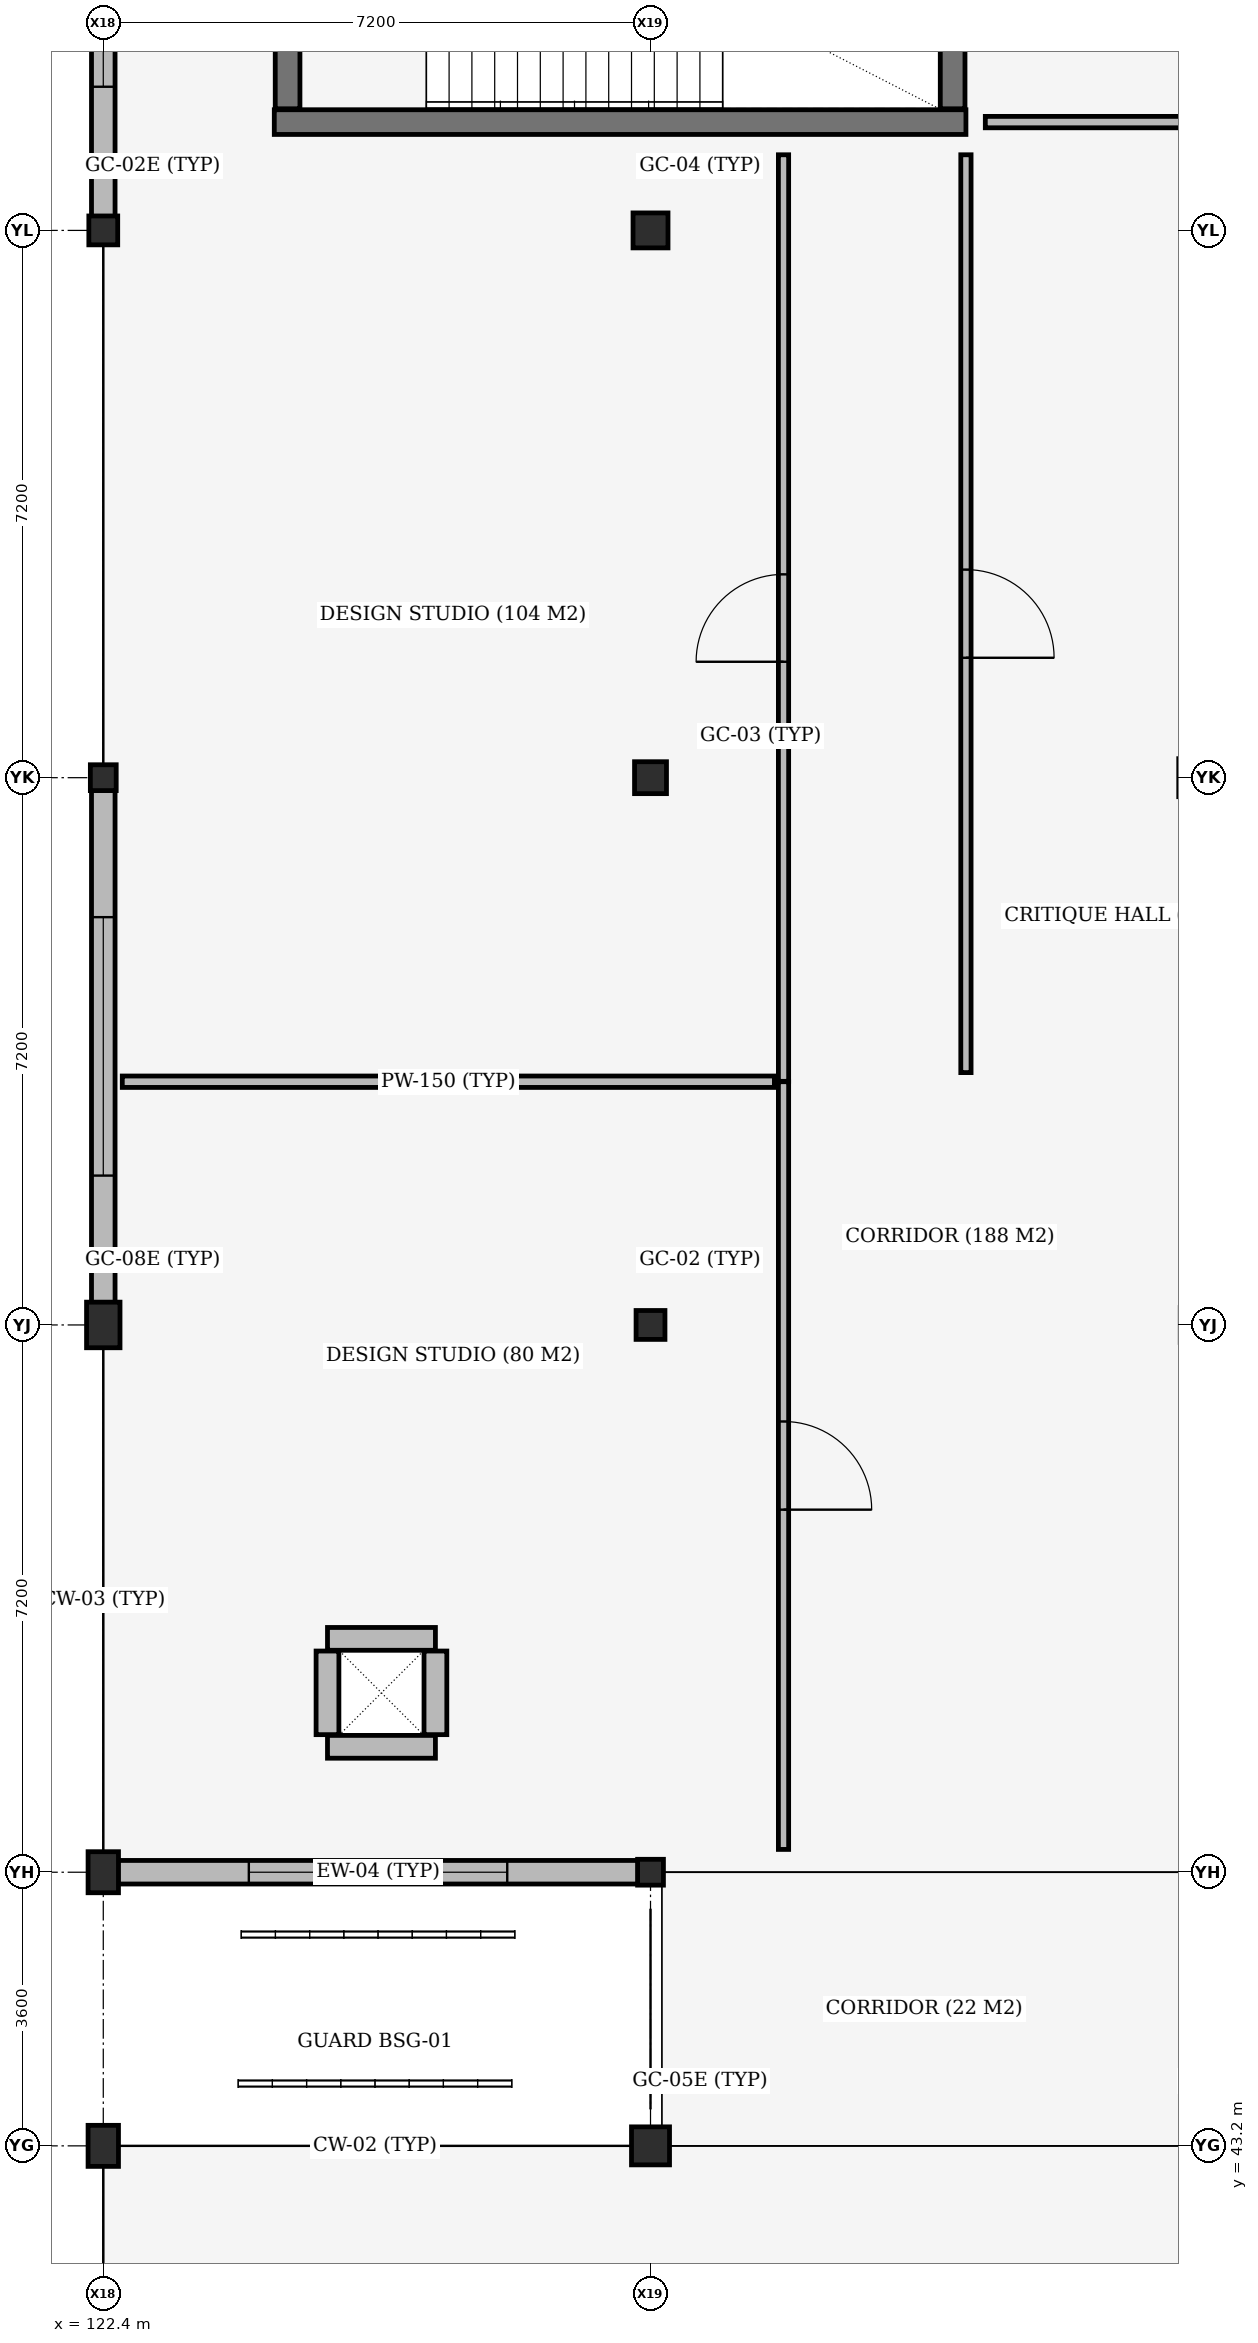
"""IFC4 building model, lengths in metres.
Left out: names, types, materials, properties, quantities, classifications, styles, units other than length and angle.
Written with IfcOpenShell. Run it as: python <this file> out.ifc"""

import sys

from ifc_helpers import new_model, si_unit, direction, frame, frame_2d, origin, origin_2d, place, context, subcontext, project, spatial, rectangle, extrude, element, fill, save


model = new_model("IFC4")
c1 = context("Model", 3, precision=1e-05, world=origin(), true_north=direction((0.0, 1.0)))
c2 = subcontext(c1, "Body", "Model", "MODEL_VIEW")
j1 = project(units=[si_unit("LENGTHUNIT", "METRE"), si_unit("PLANEANGLEUNIT", "RADIAN")], contexts=[c1])
p1 = place(None, origin())
s1 = spatial("IfcSite", under=j1, at=p1, CompositionType="ELEMENT")
p2 = place(p1, origin())
s2 = spatial("IfcBuilding", under=s1, at=p2, CompositionType="ELEMENT")
p3 = place(p2, frame((0.0, 0.0, 9.6)))
s3 = spatial("IfcBuildingStorey", under=s2, at=p3, CompositionType="ELEMENT", Elevation=9.6)
p4 = place(p3, frame((125.35, 48.45, 0.0), z_axis=(0.0, 0.0, 1.0), x_axis=(1.0, 0.0, 0.0)))
e1 = element("IfcWall", 1, at=p4, inside=s3, PredefinedType="SHEAR", context=c2, shape_type="SweptSolid", body=[
    extrude(rectangle(XDim=1.42, YDim=0.3, at=frame_2d((0.71, 0.0))), origin(), (0.0, 0.0, 1.0), 3.96),
])
p5 = place(p3, frame((126.77, 48.61, 0.0), z_axis=(0.0, 0.0, 1.0), x_axis=(0.0, 1.0, 0.0)))
e2 = element("IfcWall", 2, at=p5, inside=s3, PredefinedType="SHEAR", context=c2, shape_type="SweptSolid", body=[
    extrude(rectangle(XDim=1.1, YDim=0.3, at=frame_2d((0.55, 0.0))), origin(), (0.0, 0.0, 1.0), 3.96),
])
p6 = place(p3, frame((126.77, 49.87, 0.0), z_axis=(0.0, 0.0, 1.0), x_axis=(-1.0, 0.0, 0.0)))
e3 = element("IfcWall", 3, at=p6, inside=s3, PredefinedType="SHEAR", context=c2, shape_type="SweptSolid", body=[
    extrude(rectangle(XDim=1.42, YDim=0.3, at=frame_2d((0.71, 0.0))), origin(), (0.0, 0.0, 1.0), 3.96),
])
p7 = place(p3, frame((125.35, 49.71, 0.0), z_axis=(0.0, 0.0, 1.0), x_axis=(0.0, -1.0, 0.0)))
e4 = element("IfcWall", 4, at=p7, inside=s3, PredefinedType="SHEAR", context=c2, shape_type="SweptSolid", body=[
    extrude(rectangle(XDim=1.1, YDim=0.3, at=frame_2d((0.55, 0.0))), origin(), (0.0, 0.0, 1.0), 3.96),
])
p8 = place(p3, frame((122.4, 43.2, 0.0), z_axis=(0.0, 0.0, 1.0), x_axis=(1.0, 0.0, 0.0)))
e5 = element("IfcColumn", 5, at=p8, inside=s3, PredefinedType="COLUMN", context=c2, shape_type="SweptSolid", body=[
    extrude(rectangle(XDim=0.4, YDim=0.54, at=origin_2d()), origin(), (0.0, 0.0, 1.0), 3.92),
])
p9 = place(p3, frame((129.6, 43.2, 0.0), z_axis=(0.0, 0.0, 1.0), x_axis=(1.0, 0.0, 0.0)))
e6 = element("IfcColumn", 6, at=p9, inside=s3, PredefinedType="COLUMN", context=c2, shape_type="SweptSolid", body=[
    extrude(rectangle(XDim=0.5, YDim=0.5, at=origin_2d()), origin(), (0.0, 0.0, 1.0), 3.92),
])
p10 = place(p3, frame((122.4, 46.8, 0.0), z_axis=(0.0, 0.0, 1.0), x_axis=(1.0, 0.0, 0.0)))
e7 = element("IfcColumn", 7, at=p10, inside=s3, PredefinedType="COLUMN", context=c2, shape_type="SweptSolid", body=[
    extrude(rectangle(XDim=0.4, YDim=0.54, at=origin_2d()), origin(), (0.0, 0.0, 1.0), 3.92),
])
p11 = place(p3, frame((122.4, 54.0, 0.0), z_axis=(0.0, 0.0, 1.0), x_axis=(1.0, 0.0, 0.0)))
e8 = element("IfcColumn", 8, at=p11, inside=s3, PredefinedType="COLUMN", context=c2, shape_type="SweptSolid", body=[
    extrude(rectangle(XDim=0.44, YDim=0.6, at=origin_2d()), origin(), (0.0, 0.0, 1.0), 3.92),
])
p12 = place(p3, frame((122.4, 61.2, 0.0), z_axis=(0.0, 0.0, 1.0), x_axis=(1.0, 0.0, 0.0)))
e9 = element("IfcColumn", 9, at=p12, inside=s3, PredefinedType="COLUMN", context=c2, shape_type="SweptSolid", body=[
    extrude(rectangle(XDim=0.34, YDim=0.34, at=origin_2d()), origin(), (0.0, 0.0, 1.0), 3.92),
])
p13 = place(p3, frame((122.4, 68.4, 0.0), z_axis=(0.0, 0.0, 1.0), x_axis=(1.0, 0.0, 0.0)))
e10 = element("IfcColumn", 10, at=p13, inside=s3, PredefinedType="COLUMN", context=c2, shape_type="SweptSolid", body=[
    extrude(rectangle(XDim=0.38, YDim=0.38, at=origin_2d()), origin(), (0.0, 0.0, 1.0), 3.92),
])
p14 = place(p3, frame((129.6, 46.8, 0.0), z_axis=(0.0, 0.0, 1.0), x_axis=(1.0, 0.0, 0.0)))
e11 = element("IfcColumn", 11, at=p14, inside=s3, PredefinedType="COLUMN", context=c2, shape_type="SweptSolid", body=[
    extrude(rectangle(XDim=0.34, YDim=0.34, at=origin_2d()), origin(), (0.0, 0.0, 1.0), 3.92),
])
p15 = place(p3, frame((129.6, 54.0, 0.0), z_axis=(0.0, 0.0, 1.0), x_axis=(1.0, 0.0, 0.0)))
e12 = element("IfcColumn", 12, at=p15, inside=s3, PredefinedType="COLUMN", context=c2, shape_type="SweptSolid", body=[
    extrude(rectangle(XDim=0.38, YDim=0.38, at=origin_2d()), origin(), (0.0, 0.0, 1.0), 3.92),
])
p16 = place(p3, frame((129.6, 61.2, 0.0), z_axis=(0.0, 0.0, 1.0), x_axis=(1.0, 0.0, 0.0)))
e13 = element("IfcColumn", 13, at=p16, inside=s3, PredefinedType="COLUMN", context=c2, shape_type="SweptSolid", body=[
    extrude(rectangle(XDim=0.42, YDim=0.42, at=origin_2d()), origin(), (0.0, 0.0, 1.0), 3.92),
])
p17 = place(p3, frame((129.6, 68.4, 0.0), z_axis=(0.0, 0.0, 1.0), x_axis=(1.0, 0.0, 0.0)))
e14 = element("IfcColumn", 14, at=p17, inside=s3, PredefinedType="COLUMN", context=c2, shape_type="SweptSolid", body=[
    extrude(rectangle(XDim=0.46, YDim=0.46, at=origin_2d()), origin(), (0.0, 0.0, 1.0), 3.92),
])
p18 = place(p3, frame((124.65, 69.825, 0.0), z_axis=(0.0, 0.0, 1.0), x_axis=(1.0, 0.0, 0.0)))
e15 = element("IfcWall", 15, at=p18, inside=s3, PredefinedType="SHEAR", context=c2, shape_type="SweptSolid", body=[
    extrude(rectangle(XDim=9.1, YDim=0.325, at=frame_2d((4.55, 0.0))), origin(), (0.0, 0.0, 1.0), 3.92),
])
p19 = place(p3, frame((133.575, 70.0, 0.0), z_axis=(0.0, 0.0, 1.0), x_axis=(0.0, 1.0, 0.0)))
e16 = element("IfcWall", 16, at=p19, inside=s3, PredefinedType="SHEAR", context=c2, shape_type="SweptSolid", body=[
    extrude(rectangle(XDim=3.45, YDim=0.325, at=frame_2d((1.725, 0.0))), origin(), (0.0, 0.0, 1.0), 3.92),
])
p20 = place(p3, frame((129.438, 46.8, 0.0), z_axis=(0.0, 0.0, 1.0), x_axis=(-1.0, 0.0, 0.0)))
e17 = element("IfcWall", 17, at=p20, inside=s3, PredefinedType="STANDARD", context=c2, shape_type="SweptSolid", body=[
    extrude(rectangle(XDim=6.846, YDim=0.31, at=frame_2d((3.423, 0.0))), origin(), (0.0, 0.0, 1.0), 3.24),
])
p21 = place(p20, frame((1.723, 0.0, 0.9)))
e18 = element("IfcOpeningElement", 18, at=p21, cuts=e17, PredefinedType="OPENING", context=c2, shape_type="SweptSolid", body=[
    extrude(rectangle(XDim=3.4, YDim=1.5, at=frame_2d((1.7, 0.75))), frame((0.0, 0.165, 0.0), z_axis=(0.0, -1.0, 0.0), x_axis=(1.0, 0.0, 0.0)), (0.0, 0.0, 1.0), 0.33),
])
p22 = place(p3, frame((122.4, 54.292, 0.0), z_axis=(0.0, 0.0, 1.0), x_axis=(0.0, 1.0, 0.0)))
e19 = element("IfcWall", 19, at=p22, inside=s3, PredefinedType="STANDARD", context=c2, shape_type="SweptSolid", body=[
    extrude(rectangle(XDim=6.746, YDim=0.31, at=frame_2d((3.373, 0.0))), origin(), (0.0, 0.0, 1.0), 3.34),
])
p23 = place(p22, frame((1.673, 0.0, 0.9)))
e20 = element("IfcOpeningElement", 20, at=p23, cuts=e19, PredefinedType="OPENING", context=c2, shape_type="SweptSolid", body=[
    extrude(rectangle(XDim=3.4, YDim=1.5, at=frame_2d((1.7, 0.75))), frame((0.0, 0.165, 0.0), z_axis=(0.0, -1.0, 0.0), x_axis=(1.0, 0.0, 0.0)), (0.0, 0.0, 1.0), 0.33),
])
p24 = place(p3, frame((122.4, 68.582, 0.0), z_axis=(0.0, 0.0, 1.0), x_axis=(0.0, 1.0, 0.0)))
e21 = element("IfcWall", 21, at=p24, inside=s3, PredefinedType="STANDARD", context=c2, shape_type="SweptSolid", body=[
    extrude(rectangle(XDim=6.816, YDim=0.31, at=frame_2d((3.408, 0.0))), origin(), (0.0, 0.0, 1.0), 3.24),
])
p25 = place(p24, frame((1.708, 0.0, 0.9)))
e22 = element("IfcOpeningElement", 22, at=p25, cuts=e21, PredefinedType="OPENING", context=c2, shape_type="SweptSolid", body=[
    extrude(rectangle(XDim=3.4, YDim=1.5, at=frame_2d((1.7, 0.75))), frame((0.0, 0.165, 0.0), z_axis=(0.0, -1.0, 0.0), x_axis=(1.0, 0.0, 0.0)), (0.0, 0.0, 1.0), 0.33),
])
p26 = place(p3, frame((124.825, 73.45, 0.0), z_axis=(0.0, 0.0, 1.0), x_axis=(0.0, -1.0, 0.0)))
e23 = element("IfcWall", 23, at=p26, inside=s3, PredefinedType="SHEAR", context=c2, shape_type="SweptSolid", body=[
    extrude(rectangle(XDim=3.45, YDim=0.325, at=frame_2d((1.725, 0.0))), origin(), (0.0, 0.0, 1.0), 3.92),
])
p27 = place(p26, frame((1.035, 0.0, 0.0)))
e24 = element("IfcOpeningElement", 24, at=p27, cuts=e23, PredefinedType="OPENING", context=c2, shape_type="SweptSolid", body=[
    extrude(rectangle(XDim=1.38, YDim=2.2, at=frame_2d((0.69, 1.1))), frame((0.0, 0.172, 0.0), z_axis=(0.0, -1.0, 0.0), x_axis=(1.0, 0.0, 0.0)), (0.0, 0.0, 1.0), 0.345),
])
p28 = place(p3, frame((131.35, 47.1, 0.0), z_axis=(0.0, 0.0, 1.0), x_axis=(0.0, 1.0, 0.0)))
e25 = element("IfcWall", 25, at=p28, inside=s3, PredefinedType="PARTITIONING", context=c2, shape_type="SweptSolid", body=[
    extrude(rectangle(XDim=10.1, YDim=0.135, at=frame_2d((5.05, 0.0))), origin(), (0.0, 0.0, 1.0), 3.18),
])
p29 = place(p28, frame((4.47, 0.0, 0.0)))
e26 = element("IfcOpeningElement", 26, at=p29, cuts=e25, PredefinedType="OPENING", context=c2, shape_type="SweptSolid", body=[
    extrude(rectangle(XDim=1.16, YDim=2.2, at=frame_2d((0.58, 1.1))), frame((0.0, 0.077, 0.0), z_axis=(0.0, -1.0, 0.0), x_axis=(1.0, 0.0, 0.0)), (0.0, 0.0, 1.0), 0.155),
])
p30 = place(p3, frame((122.65, 57.2, 0.0), z_axis=(0.0, 0.0, 1.0), x_axis=(1.0, 0.0, 0.0)))
e27 = element("IfcWall", 27, at=p30, inside=s3, PredefinedType="PARTITIONING", context=c2, shape_type="SweptSolid", body=[
    extrude(rectangle(XDim=8.58, YDim=0.15, at=frame_2d((4.29, 0.0))), origin(), (0.0, 0.0, 1.0), 3.18),
])
p31 = place(p3, frame((131.35, 57.205, 0.0), z_axis=(0.0, 0.0, 1.0), x_axis=(0.0, 1.0, 0.0)))
e28 = element("IfcWall", 28, at=p31, inside=s3, PredefinedType="PARTITIONING", context=c2, shape_type="SweptSolid", body=[
    extrude(rectangle(XDim=12.19, YDim=0.135, at=frame_2d((6.095, 0.0))), origin(), (0.0, 0.0, 1.0), 3.24),
])
p32 = place(p31, frame((5.52, 0.0, 0.0)))
e29 = element("IfcOpeningElement", 29, at=p32, cuts=e28, PredefinedType="OPENING", context=c2, shape_type="SweptSolid", body=[
    extrude(rectangle(XDim=1.15, YDim=2.2, at=frame_2d((0.575, 1.1))), frame((0.0, 0.077, 0.0), z_axis=(0.0, -1.0, 0.0), x_axis=(1.0, 0.0, 0.0)), (0.0, 0.0, 1.0), 0.155),
])
p33 = place(p3, frame((133.75, 57.32, 0.0), z_axis=(0.0, 0.0, 1.0), x_axis=(0.0, 1.0, 0.0)))
e30 = element("IfcWall", 30, at=p33, inside=s3, PredefinedType="PARTITIONING", context=c2, shape_type="SweptSolid", body=[
    extrude(rectangle(XDim=12.075, YDim=0.135, at=frame_2d((6.038, 0.0))), origin(), (0.0, 0.0, 1.0), 3.24),
])
p34 = place(p33, frame((5.458, 0.0, 0.0)))
e31 = element("IfcOpeningElement", 31, at=p34, cuts=e30, PredefinedType="OPENING", context=c2, shape_type="SweptSolid", body=[
    extrude(rectangle(XDim=1.16, YDim=2.2, at=frame_2d((0.58, 1.1))), frame((0.0, 0.077, 0.0), z_axis=(0.0, -1.0, 0.0), x_axis=(1.0, 0.0, 0.0)), (0.0, 0.0, 1.0), 0.155),
])
p35 = place(p3, frame((134.005, 69.825, 0.0), z_axis=(0.0, 0.0, 1.0), x_axis=(1.0, 0.0, 0.0)))
e32 = element("IfcWall", 32, at=p35, inside=s3, PredefinedType="PARTITIONING", context=c2, shape_type="SweptSolid", body=[
    extrude(rectangle(XDim=23.89, YDim=0.15, at=frame_2d((11.945, 0.0))), origin(), (0.0, 0.0, 1.0), 3.24),
])
p36 = place(p21, origin())
e33 = element("IfcWindow", 33, at=p36, inside=s3, PartitioningType="DOUBLE_PANEL_VERTICAL", PredefinedType="WINDOW", context=c2, shape_type="SweptSolid", body=[
    extrude(rectangle(XDim=3.4, YDim=1.5, at=frame_2d((1.7, 0.75))), frame((0.0, 0.03, 0.0), z_axis=(0.0, -1.0, 0.0), x_axis=(1.0, 0.0, 0.0)), (0.0, 0.0, 1.0), 0.06),
])
fill(e18, e33)
p37 = place(p23, origin())
e34 = element("IfcWindow", 34, at=p37, inside=s3, PartitioningType="DOUBLE_PANEL_VERTICAL", PredefinedType="WINDOW", context=c2, shape_type="SweptSolid", body=[
    extrude(rectangle(XDim=3.4, YDim=1.5, at=frame_2d((1.7, 0.75))), frame((0.0, 0.03, 0.0), z_axis=(0.0, -1.0, 0.0), x_axis=(1.0, 0.0, 0.0)), (0.0, 0.0, 1.0), 0.06),
])
fill(e20, e34)
p38 = place(p25, origin())
e35 = element("IfcWindow", 35, at=p38, inside=s3, PartitioningType="DOUBLE_PANEL_VERTICAL", PredefinedType="WINDOW", context=c2, shape_type="SweptSolid", body=[
    extrude(rectangle(XDim=3.4, YDim=1.5, at=frame_2d((1.7, 0.75))), frame((0.0, 0.03, 0.0), z_axis=(0.0, -1.0, 0.0), x_axis=(1.0, 0.0, 0.0)), (0.0, 0.0, 1.0), 0.06),
])
fill(e22, e35)
p39 = place(p29, origin())
e36 = element("IfcDoor", 36, at=p39, inside=s3, OperationType="SINGLE_SWING_RIGHT", PredefinedType="DOOR", context=c2, shape_type="SweptSolid", body=[
    extrude(rectangle(XDim=1.16, YDim=2.2, at=frame_2d((0.58, 1.1))), frame((0.0, 0.025, 0.0), z_axis=(0.0, -1.0, 0.0), x_axis=(1.0, 0.0, 0.0)), (0.0, 0.0, 1.0), 0.05),
])
fill(e26, e36)
p40 = place(p32, origin())
e37 = element("IfcDoor", 37, at=p40, inside=s3, OperationType="SINGLE_SWING_LEFT", PredefinedType="DOOR", context=c2, shape_type="SweptSolid", body=[
    extrude(rectangle(XDim=1.15, YDim=2.2, at=frame_2d((0.575, 1.1))), frame((0.0, 0.025, 0.0), z_axis=(0.0, -1.0, 0.0), x_axis=(1.0, 0.0, 0.0)), (0.0, 0.0, 1.0), 0.05),
])
fill(e29, e37)
p41 = place(p34, origin())
e38 = element("IfcDoor", 38, at=p41, inside=s3, OperationType="SINGLE_SWING_RIGHT", PredefinedType="DOOR", context=c2, shape_type="SweptSolid", body=[
    extrude(rectangle(XDim=1.16, YDim=2.2, at=frame_2d((0.58, 1.1))), frame((0.0, 0.025, 0.0), z_axis=(0.0, -1.0, 0.0), x_axis=(1.0, 0.0, 0.0)), (0.0, 0.0, 1.0), 0.05),
])
fill(e31, e38)
save(model, sys.argv[1])
